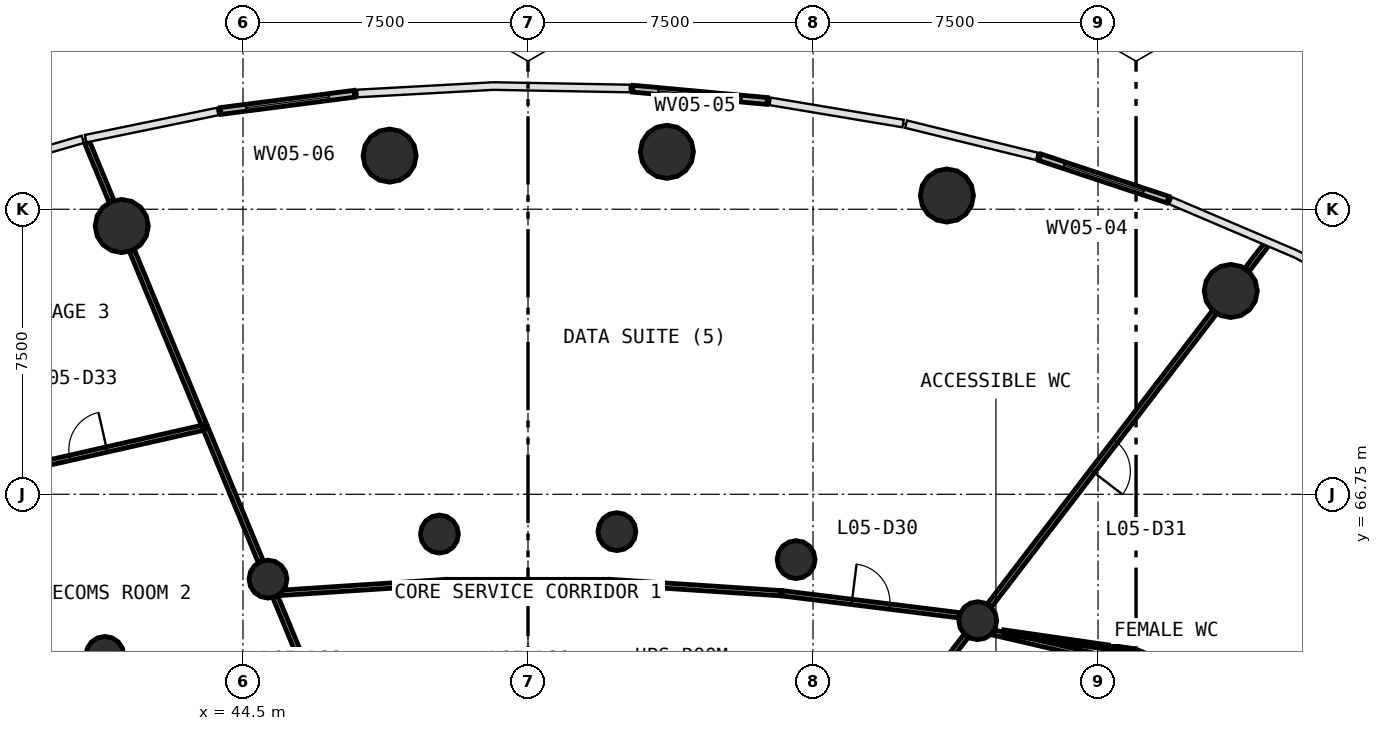
"""IFC4 building model, lengths in metres.
Left out: names, types, materials, properties, quantities, classifications, styles, units other than length and angle.
Written with IfcOpenShell. Run it as: python <this file> out.ifc"""

import sys

from ifc_helpers import new_model, si_unit, direction, frame, frame_2d, origin, origin_2d, place, context, subcontext, project, spatial, rectangle, circle, extrude, source, transform, mapped, element, fill, save


model = new_model("IFC4")
c1 = context("Model", 3, precision=1e-05, world=origin(), true_north=direction((0.0, 1.0)))
c2 = subcontext(c1, "Body", "Model", "MODEL_VIEW")
j1 = project(units=[si_unit("LENGTHUNIT", "METRE"), si_unit("PLANEANGLEUNIT", "RADIAN")], contexts=[c1])
p1 = place(None, origin())
s1 = spatial("IfcSite", under=j1, at=p1, CompositionType="ELEMENT")
p2 = place(p1, origin())
s2 = spatial("IfcBuilding", under=s1, at=p2, CompositionType="ELEMENT")
p3 = place(p2, frame((0.0, 0.0, 22.6)))
s3 = spatial("IfcBuildingStorey", under=s2, at=p3, CompositionType="ELEMENT", Elevation=22.6)
m1 = source(origin(), c2, "Body", "SweptSolid", [
    extrude(circle(Radius=0.7, at=origin_2d()), origin(), (0.0, 0.0, 1.0), 4.4),
])
for number, where, z_axis, x_axis in (
    (1, (70.492, 72.1, 0.0), (0.0, 0.0, 1.0), (1.0, 0.0, 0.0)),
    (2, (63.023, 74.611, 0.0), (0.0, 0.0, 1.0), (1.0, 0.0, 0.0)),
    (3, (55.655, 75.761, 0.0), (0.0, 0.0, 1.0), (1.0, 0.0, 0.0)),
    (4, (48.358, 75.661, 0.0), (0.0, 0.0, 1.0), (1.0, 0.0, 0.0)),
    (5, (41.31, 73.809, 0.0), (0.0, 0.0, 1.0), (1.0, 0.0, 0.0)),
):
    element("IfcColumn", number, at=place(p3, frame(where, z_axis=z_axis, x_axis=x_axis)), inside=s3, PredefinedType="COLUMN", context=c2, shape_type="MappedRepresentation", body=[
        mapped(m1, transform((0.0, 0.0, 0.0), scale=1.0)),
    ])
m2 = source(origin(), c2, "Body", "SweptSolid", [
    extrude(circle(Radius=0.5, at=origin_2d()), origin(), (0.0, 0.0, 1.0), 4.4),
])
for number, where, z_axis, x_axis in (
    (6, (63.835, 63.424, 0.0), (0.0, 0.0, 1.0), (1.0, 0.0, 0.0)),
    (7, (59.055, 65.031, 0.0), (0.0, 0.0, 1.0), (1.0, 0.0, 0.0)),
    (8, (54.339, 65.767, 0.0), (0.0, 0.0, 1.0), (1.0, 0.0, 0.0)),
    (9, (49.669, 65.703, 0.0), (0.0, 0.0, 1.0), (1.0, 0.0, 0.0)),
    (10, (45.158, 64.518, 0.0), (0.0, 0.0, 1.0), (1.0, 0.0, 0.0)),
    (11, (40.866, 62.51, 0.0), (0.0, 0.0, 1.0), (1.0, 0.0, 0.0)),
):
    element("IfcColumn", number, at=place(p3, frame(where, z_axis=z_axis, x_axis=x_axis)), inside=s3, PredefinedType="COLUMN", context=c2, shape_type="MappedRepresentation", body=[
        mapped(m2, transform((0.0, 0.0, 0.0), scale=1.0)),
    ])
p4 = place(p3, frame((68.837, 74.503, 0.0), z_axis=(0.0, 0.0, 1.0), x_axis=(-0.949246159188, 0.314534146425, 0.0)))
e12 = element("IfcWall", 12, at=p4, inside=s3, PredefinedType="STANDARD", context=c2, shape_type="SweptSolid", body=[
    extrude(rectangle(XDim=3.547, YDim=0.18, at=frame_2d((1.773, 0.0))), origin(), (0.0, 0.0, 1.0), 3.95),
])
p5 = place(p4, frame((0.674, 0.0, 0.9)))
e13 = element("IfcOpeningElement", 13, at=p5, cuts=e12, PredefinedType="OPENING", context=c2, shape_type="SweptSolid", body=[
    extrude(rectangle(XDim=2.2, YDim=2.2, at=frame_2d((1.1, 1.1))), frame((0.0, 0.1, 0.0), z_axis=(0.0, -1.0, 0.0), x_axis=(1.0, 0.0, 0.0)), (0.0, 0.0, 1.0), 0.2),
])
p6 = place(p3, frame((58.292, 77.099, 0.0), z_axis=(0.0, 0.0, 1.0), x_axis=(-0.995833762516, 0.091187265745, 0.0)))
e14 = element("IfcWall", 14, at=p6, inside=s3, PredefinedType="STANDARD", context=c2, shape_type="SweptSolid", body=[
    extrude(rectangle(XDim=3.548, YDim=0.18, at=frame_2d((1.774, 0.0))), origin(), (0.0, 0.0, 1.0), 3.95),
])
p7 = place(p6, frame((0.674, 0.0, 0.9)))
e15 = element("IfcOpeningElement", 15, at=p7, cuts=e14, PredefinedType="OPENING", context=c2, shape_type="SweptSolid", body=[
    extrude(rectangle(XDim=2.2, YDim=2.2, at=frame_2d((1.1, 1.1))), frame((0.0, 0.1, 0.0), z_axis=(0.0, -1.0, 0.0), x_axis=(1.0, 0.0, 0.0)), (0.0, 0.0, 1.0), 0.2),
])
p8 = place(p3, frame((47.431, 77.289, 0.0), z_axis=(0.0, 0.0, 1.0), x_axis=(-0.991799548693, -0.127803189364, 0.0)))
e16 = element("IfcWall", 16, at=p8, inside=s3, PredefinedType="STANDARD", context=c2, shape_type="SweptSolid", body=[
    extrude(rectangle(XDim=3.547, YDim=0.18, at=frame_2d((1.774, 0.0))), origin(), (0.0, 0.0, 1.0), 3.95),
])
p9 = place(p8, frame((0.674, 0.0, 0.9)))
e17 = element("IfcOpeningElement", 17, at=p9, cuts=e16, PredefinedType="OPENING", context=c2, shape_type="SweptSolid", body=[
    extrude(rectangle(XDim=2.2, YDim=2.2, at=frame_2d((1.1, 1.1))), frame((0.0, 0.1, 0.0), z_axis=(0.0, -1.0, 0.0), x_axis=(1.0, 0.0, 0.0)), (0.0, 0.0, 1.0), 0.2),
])
p10 = place(p3, frame((70.064, 71.541, 0.0), z_axis=(0.0, 0.0, 1.0), x_axis=(-0.608770295053, -0.793346537057, 0.0)))
e18 = element("IfcWall", 18, at=p10, inside=s3, PredefinedType="PARTITIONING", context=c2, shape_type="SweptSolid", body=[
    extrude(rectangle(XDim=9.727, YDim=0.14, at=frame_2d((4.864, 0.0))), origin(), (0.0, 0.0, 1.0), 3.05),
])
p11 = place(p10, frame((4.277, 0.0, 0.0)))
e19 = element("IfcOpeningElement", 19, at=p11, cuts=e18, PredefinedType="OPENING", context=c2, shape_type="SweptSolid", body=[
    extrude(rectangle(XDim=1.0, YDim=2.1, at=frame_2d((0.5, 1.05))), frame((0.0, 0.08, 0.0), z_axis=(0.0, -1.0, 0.0), x_axis=(1.0, 0.0, 0.0)), (0.0, 0.0, 1.0), 0.16),
])
p12 = place(p3, frame((37.361, 67.122, 0.0), z_axis=(0.0, 0.0, 1.0), x_axis=(0.975258757594, 0.221066405717, 0.0)))
e20 = element("IfcWall", 20, at=p12, inside=s3, PredefinedType="PARTITIONING", context=c2, shape_type="SweptSolid", body=[
    extrude(rectangle(XDim=6.297, YDim=0.14, at=frame_2d((3.148, 0.0))), origin(), (0.0, 0.0, 1.0), 3.05),
])
p13 = place(p12, frame((2.647, 0.0, 0.0)))
e21 = element("IfcOpeningElement", 21, at=p13, cuts=e20, PredefinedType="OPENING", context=c2, shape_type="SweptSolid", body=[
    extrude(rectangle(XDim=1.0, YDim=2.1, at=frame_2d((0.5, 1.05))), frame((0.0, 0.08, 0.0), z_axis=(0.0, -1.0, 0.0), x_axis=(1.0, 0.0, 0.0)), (0.0, 0.0, 1.0), 0.16),
])
p14 = place(p3, frame((69.936, 61.792, 0.0), z_axis=(0.0, 0.0, 1.0), x_axis=(-0.974090144773, 0.226160097844, 0.0)))
e22 = element("IfcWall", 22, at=p14, inside=s3, PredefinedType="PARTITIONING", context=c2, shape_type="SweptSolid", body=[
    extrude(rectangle(XDim=5.853, YDim=0.14, at=frame_2d((2.927, 0.0))), origin(), (0.0, 0.0, 1.0), 3.05),
])
p15 = place(p3, frame((43.476, 68.58, 0.0), z_axis=(0.0, 0.0, 1.0), x_axis=(-0.382679643563, 0.923881101875, 0.0)))
e23 = element("IfcWall", 23, at=p15, inside=s3, PredefinedType="PARTITIONING", context=c2, shape_type="SweptSolid", body=[
    extrude(rectangle(XDim=4.955, YDim=0.14, at=frame_2d((2.477, 0.0))), origin(), (0.0, 0.0, 1.0), 3.05),
])
p16 = place(p3, frame((58.688, 64.145, 0.0), z_axis=(0.0, 0.0, 1.0), x_axis=(0.992396516621, -0.123081898742, 0.0)))
e24 = element("IfcWall", 24, at=p16, inside=s3, PredefinedType="PARTITIONING", context=c2, shape_type="SweptSolid", body=[
    extrude(rectangle(XDim=4.699, YDim=0.14, at=frame_2d((2.35, 0.0))), origin(), (0.0, 0.0, 1.0), 3.05),
])
p17 = place(p16, frame((1.849, 0.0, 0.0)))
e25 = element("IfcOpeningElement", 25, at=p17, cuts=e24, PredefinedType="OPENING", context=c2, shape_type="SweptSolid", body=[
    extrude(rectangle(XDim=1.0, YDim=2.1, at=frame_2d((0.5, 1.05))), frame((0.0, 0.08, 0.0), z_axis=(0.0, -1.0, 0.0), x_axis=(1.0, 0.0, 0.0)), (0.0, 0.0, 1.0), 0.16),
])
p18 = place(p3, frame((58.658, 64.147, 0.0), z_axis=(0.0, 0.0, 1.0), x_axis=(-0.997859849847, 0.065388990378, 0.0)))
e26 = element("IfcWall", 26, at=p18, inside=s3, PredefinedType="PARTITIONING", context=c2, shape_type="SweptSolid", body=[
    extrude(rectangle(XDim=4.503, YDim=0.14, at=frame_2d((2.251, 0.0))), origin(), (0.0, 0.0, 1.0), 3.05),
])
p19 = place(p3, frame((49.835, 64.441, 0.0), z_axis=(0.0, 0.0, 1.0), x_axis=(-0.997860808016, -0.065374366729, 0.0)))
e27 = element("IfcWall", 27, at=p19, inside=s3, PredefinedType="PARTITIONING", context=c2, shape_type="SweptSolid", body=[
    extrude(rectangle(XDim=4.332, YDim=0.14, at=frame_2d((2.166, 0.0))), origin(), (0.0, 0.0, 1.0), 3.05),
])
p20 = place(p3, frame((54.135, 64.441, 0.0), z_axis=(0.0, 0.0, 1.0), x_axis=(-1.0, 0.0, 0.0)))
e28 = element("IfcWall", 28, at=p20, inside=s3, PredefinedType="PARTITIONING", context=c2, shape_type="SweptSolid", body=[
    extrude(rectangle(XDim=4.269, YDim=0.14, at=frame_2d((2.135, 0.0))), origin(), (0.0, 0.0, 1.0), 3.05),
])
p21 = place(p3, frame((46.826, 60.49, 0.0), z_axis=(0.0, 0.0, 1.0), x_axis=(-0.382644558062, 0.923895633817, 0.0)))
e29 = element("IfcWall", 29, at=p21, inside=s3, PredefinedType="PARTITIONING", context=c2, shape_type="SweptSolid", body=[
    extrude(rectangle(XDim=3.854, YDim=0.14, at=frame_2d((1.927, 0.0))), origin(), (0.0, 0.0, 1.0), 3.05),
])
p22 = place(p3, frame((44.965, 64.984, 0.0), z_axis=(0.0, 0.0, 1.0), x_axis=(-0.382721482583, 0.923863770677, 0.0)))
e30 = element("IfcWall", 30, at=p22, inside=s3, PredefinedType="PARTITIONING", context=c2, shape_type="SweptSolid", body=[
    extrude(rectangle(XDim=3.791, YDim=0.14, at=frame_2d((1.896, 0.0))), origin(), (0.0, 0.0, 1.0), 3.05),
])
p23 = place(p3, frame((61.584, 60.49, 0.0), z_axis=(0.0, 0.0, 1.0), x_axis=(0.60874605662, 0.793365135703, 0.0)))
e31 = element("IfcWall", 31, at=p23, inside=s3, PredefinedType="PARTITIONING", context=c2, shape_type="SweptSolid", body=[
    extrude(rectangle(XDim=3.194, YDim=0.14, at=frame_2d((1.597, 0.0))), origin(), (0.0, 0.0, 1.0), 3.05),
])
p24 = place(p3, frame((41.04, 74.46, 0.0), z_axis=(0.0, 0.0, 1.0), x_axis=(-0.382571117301, 0.923926046936, 0.0)))
e32 = element("IfcWall", 32, at=p24, inside=s3, PredefinedType="PARTITIONING", context=c2, shape_type="SweptSolid", body=[
    extrude(rectangle(XDim=1.671, YDim=0.14, at=frame_2d((0.836, 0.0))), origin(), (0.0, 0.0, 1.0), 3.05),
])
p25 = place(p3, frame((70.921, 72.658, 0.0), z_axis=(0.0, 0.0, 1.0), x_axis=(0.608939798959, 0.793216440351, 0.0)))
e33 = element("IfcWall", 33, at=p25, inside=s3, PredefinedType="PARTITIONING", context=c2, shape_type="SweptSolid", body=[
    extrude(rectangle(XDim=0.827, YDim=0.14, at=frame_2d((0.413, 0.0))), origin(), (0.0, 0.0, 1.0), 3.05),
])
p26 = place(p3, frame((67.961, 62.626, 0.0), z_axis=(0.0, 0.0, 1.0), x_axis=(-0.989753784828, 0.142784611983, 0.0)))
e34 = element("IfcWall", 34, at=p26, inside=s3, PredefinedType="PARTITIONING", context=c2, shape_type="SweptSolid", body=[
    extrude(rectangle(XDim=3.485, YDim=0.12, at=frame_2d((1.742, 0.0))), origin(), (0.0, 0.0, 1.0), 3.05),
])
p27 = place(p3, frame((69.581, 61.946, 0.0), z_axis=(0.0, 0.0, 1.0), x_axis=(-0.922217151055, 0.386672375921, 0.0)))
e35 = element("IfcWall", 35, at=p27, inside=s3, PredefinedType="PARTITIONING", context=c2, shape_type="SweptSolid", body=[
    extrude(rectangle(XDim=1.727, YDim=0.12, at=frame_2d((0.863, 0.0))), origin(), (0.0, 0.0, 1.0), 3.05),
])
m3 = source(origin(), c2, "Body", "SweptSolid", [
    extrude(rectangle(XDim=2.2, YDim=2.2, at=frame_2d((1.1, 1.1))), frame((0.0, 0.03, 0.0), z_axis=(0.0, -1.0, 0.0), x_axis=(1.0, 0.0, 0.0)), (0.0, 0.0, 1.0), 0.06),
])
p28 = place(p5, origin())
e36 = element("IfcWindow", 36, at=p28, inside=s3, PartitioningType="SINGLE_PANEL", PredefinedType="WINDOW", context=c2, shape_type="MappedRepresentation", body=[
    mapped(m3, transform((0.0, 0.0, 0.0), scale=1.0)),
])
fill(e13, e36)
p29 = place(p7, origin())
e37 = element("IfcWindow", 37, at=p29, inside=s3, PartitioningType="SINGLE_PANEL", PredefinedType="WINDOW", context=c2, shape_type="MappedRepresentation", body=[
    mapped(m3, transform((0.0, 0.0, 0.0), scale=1.0)),
])
fill(e15, e37)
p30 = place(p9, origin())
e38 = element("IfcWindow", 38, at=p30, inside=s3, PartitioningType="SINGLE_PANEL", PredefinedType="WINDOW", context=c2, shape_type="MappedRepresentation", body=[
    mapped(m3, transform((0.0, 0.0, 0.0), scale=1.0)),
])
fill(e17, e38)
m4 = source(origin(), c2, "Body", "SweptSolid", [
    extrude(rectangle(XDim=1.0, YDim=2.1, at=frame_2d((0.5, 1.05))), frame((0.0, 0.025, 0.0), z_axis=(0.0, -1.0, 0.0), x_axis=(1.0, 0.0, 0.0)), (0.0, 0.0, 1.0), 0.05),
])
p31 = place(p17, origin())
e39 = element("IfcDoor", 39, at=p31, inside=s3, OperationType="SINGLE_SWING_LEFT", PredefinedType="DOOR", context=c2, shape_type="MappedRepresentation", body=[
    mapped(m4, transform((0.0, 0.0, 0.0), scale=1.0)),
])
fill(e25, e39)
p32 = place(p11, origin())
e40 = element("IfcDoor", 40, at=p32, inside=s3, OperationType="SINGLE_SWING_RIGHT", PredefinedType="DOOR", context=c2, shape_type="MappedRepresentation", body=[
    mapped(m4, transform((0.0, 0.0, 0.0), scale=1.0)),
])
fill(e19, e40)
p33 = place(p13, origin())
e41 = element("IfcDoor", 41, at=p33, inside=s3, OperationType="SINGLE_SWING_RIGHT", PredefinedType="DOOR", context=c2, shape_type="MappedRepresentation", body=[
    mapped(m4, transform((0.0, 0.0, 0.0), scale=1.0)),
])
fill(e21, e41)
save(model, sys.argv[1])
